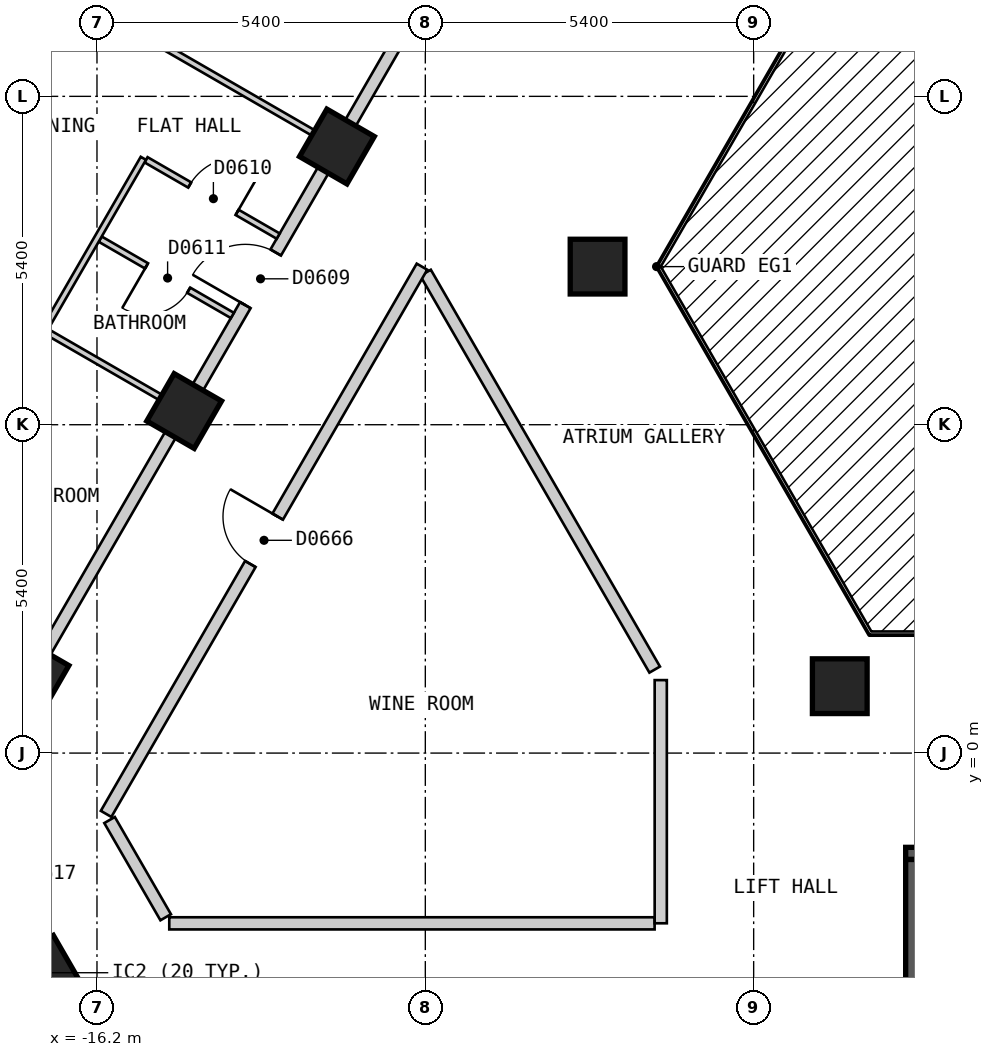
"""IFC4 building model, lengths in metres.
Left out: names, types, materials, properties, quantities, classifications, styles, units other than length and angle.
Written with IfcOpenShell. Run it as: python <this file> out.ifc"""

import sys

from ifc_helpers import new_model, si_unit, direction, frame, frame_2d, origin, origin_2d, place, context, subcontext, project, spatial, polyline, rectangle, outline, extrude, element, fill, save


model = new_model("IFC4")
c1 = context("Model", 3, precision=1e-05, world=origin(), true_north=direction((0.0, 1.0)))
c2 = subcontext(c1, "Body", "Model", "MODEL_VIEW")
j1 = project(units=[si_unit("LENGTHUNIT", "METRE"), si_unit("PLANEANGLEUNIT", "RADIAN")], contexts=[c1])
p1 = place(None, origin())
s1 = spatial("IfcSite", under=j1, at=p1, CompositionType="ELEMENT")
p2 = place(p1, origin())
s2 = spatial("IfcBuilding", under=s1, at=p2, CompositionType="ELEMENT")
p3 = place(p2, frame((0.0, 0.0, 81.0)))
s3 = spatial("IfcBuildingStorey", under=s2, at=p3, CompositionType="ELEMENT", Elevation=81.0)
for number, where, z_axis, x_axis in (
    (1, (-17.083, -3.612, 0.0), (0.0, 0.0, 1.0), (0.5, -0.866, 0.0)),
    (2, (-7.967, 8.0, 0.0), (0.0, 0.0, 1.0), (1.0, 0.0, 0.0)),
    (3, (-12.254, 9.975, 0.0), (0.0, 0.0, 1.0), (-0.5, -0.866, 0.0)),
    (4, (-14.766, 5.625, 0.0), (0.0, 0.0, 1.0), (-0.5, -0.866, 0.0)),
    (5, (-3.984, 1.1, 0.0), (0.0, 0.0, 1.0), (1.0, 0.0, 0.0)),
    (6, (-17.277, 1.275, 0.0), (0.0, 0.0, 1.0), (-0.5, -0.866, 0.0)),
):
    element("IfcColumn", number, at=place(p3, frame(where, z_axis=z_axis, x_axis=x_axis)), inside=s3, PredefinedType="COLUMN", context=c2, shape_type="SweptSolid", body=[
        extrude(rectangle(XDim=0.9, YDim=0.9, at=origin_2d()), origin(), (0.0, 0.0, 1.0), 3.0),
    ])
p4 = place(p3, frame((-15.747, 24.425, 0.0), z_axis=(0.0, 0.0, 1.0), x_axis=(-0.500027479704, -0.866009537788, 0.0)))
e7 = element("IfcWall", 7, at=p4, inside=s3, PredefinedType="SOLIDWALL", context=c2, shape_type="SweptSolid", body=[
    extrude(outline(polyline([(0.0, -0.15), (26.559, -0.15), (26.478, 0.15), (0.08, 0.15), (0.0, -0.15)])), origin(), (0.0, 0.0, 1.0), 2.7),
])
p5 = place(p4, frame((1.227, 0.0, 0.15)))
e8 = element("IfcOpeningElement", 8, at=p5, cuts=e7, PredefinedType="OPENING", context=c2, shape_type="SweptSolid", body=[
    extrude(rectangle(XDim=1.5, YDim=2.1, at=frame_2d((0.75, 1.05))), frame((0.0, 0.16, 0.0), z_axis=(0.0, -1.0, 0.0), x_axis=(1.0, 0.0, 0.0)), (0.0, 0.0, 1.0), 0.32),
])
p6 = place(p4, frame((3.739, 0.0, 0.15)))
e9 = element("IfcOpeningElement", 9, at=p6, cuts=e7, PredefinedType="OPENING", context=c2, shape_type="SweptSolid", body=[
    extrude(rectangle(XDim=1.5, YDim=2.1, at=frame_2d((0.75, 1.05))), frame((0.0, 0.16, 0.0), z_axis=(0.0, -1.0, 0.0), x_axis=(1.0, 0.0, 0.0)), (0.0, 0.0, 1.0), 0.32),
])
p7 = place(p4, frame((6.25, 0.0, 0.15)))
e10 = element("IfcOpeningElement", 10, at=p7, cuts=e7, PredefinedType="OPENING", context=c2, shape_type="SweptSolid", body=[
    extrude(rectangle(XDim=1.5, YDim=2.1, at=frame_2d((0.75, 1.05))), frame((0.0, 0.16, 0.0), z_axis=(0.0, -1.0, 0.0), x_axis=(1.0, 0.0, 0.0)), (0.0, 0.0, 1.0), 0.32),
])
p8 = place(p4, frame((8.761, 0.0, 0.15)))
e11 = element("IfcOpeningElement", 11, at=p8, cuts=e7, PredefinedType="OPENING", context=c2, shape_type="SweptSolid", body=[
    extrude(rectangle(XDim=1.5, YDim=2.1, at=frame_2d((0.75, 1.05))), frame((0.0, 0.16, 0.0), z_axis=(0.0, -1.0, 0.0), x_axis=(1.0, 0.0, 0.0)), (0.0, 0.0, 1.0), 0.32),
])
p9 = place(p4, frame((11.273, 0.0, 0.15)))
e12 = element("IfcOpeningElement", 12, at=p9, cuts=e7, PredefinedType="OPENING", context=c2, shape_type="SweptSolid", body=[
    extrude(rectangle(XDim=1.5, YDim=2.1, at=frame_2d((0.75, 1.05))), frame((0.0, 0.16, 0.0), z_axis=(0.0, -1.0, 0.0), x_axis=(1.0, 0.0, 0.0)), (0.0, 0.0, 1.0), 0.32),
])
p10 = place(p4, frame((13.785, 0.0, 0.15)))
e13 = element("IfcOpeningElement", 13, at=p10, cuts=e7, PredefinedType="OPENING", context=c2, shape_type="SweptSolid", body=[
    extrude(rectangle(XDim=1.5, YDim=2.1, at=frame_2d((0.75, 1.05))), frame((0.0, 0.16, 0.0), z_axis=(0.0, -1.0, 0.0), x_axis=(1.0, 0.0, 0.0)), (0.0, 0.0, 1.0), 0.32),
])
p11 = place(p4, frame((16.296, 0.0, 0.15)))
e14 = element("IfcOpeningElement", 14, at=p11, cuts=e7, PredefinedType="OPENING", context=c2, shape_type="SweptSolid", body=[
    extrude(rectangle(XDim=1.5, YDim=2.1, at=frame_2d((0.75, 1.05))), frame((0.0, 0.16, 0.0), z_axis=(0.0, -1.0, 0.0), x_axis=(1.0, 0.0, 0.0)), (0.0, 0.0, 1.0), 0.32),
])
p12 = place(p4, frame((18.807, 0.0, 0.15)))
e15 = element("IfcOpeningElement", 15, at=p12, cuts=e7, PredefinedType="OPENING", context=c2, shape_type="SweptSolid", body=[
    extrude(rectangle(XDim=1.5, YDim=2.1, at=frame_2d((0.75, 1.05))), frame((0.0, 0.16, 0.0), z_axis=(0.0, -1.0, 0.0), x_axis=(1.0, 0.0, 0.0)), (0.0, 0.0, 1.0), 0.32),
])
p13 = place(p4, frame((21.319, 0.0, 0.15)))
e16 = element("IfcOpeningElement", 16, at=p13, cuts=e7, PredefinedType="OPENING", context=c2, shape_type="SweptSolid", body=[
    extrude(rectangle(XDim=1.5, YDim=2.1, at=frame_2d((0.75, 1.05))), frame((0.0, 0.16, 0.0), z_axis=(0.0, -1.0, 0.0), x_axis=(1.0, 0.0, 0.0)), (0.0, 0.0, 1.0), 0.32),
])
p14 = place(p4, frame((23.831, 0.0, 0.15)))
e17 = element("IfcOpeningElement", 17, at=p14, cuts=e7, PredefinedType="OPENING", context=c2, shape_type="SweptSolid", body=[
    extrude(rectangle(XDim=1.5, YDim=2.1, at=frame_2d((0.75, 1.05))), frame((0.0, 0.16, 0.0), z_axis=(0.0, -1.0, 0.0), x_axis=(1.0, 0.0, 0.0)), (0.0, 0.0, 1.0), 0.32),
])
p15 = place(p3, frame((-2.9, -1.65, 0.0), z_axis=(0.0, 0.0, 1.0), x_axis=(1.0, 0.0, 0.0)))
e18 = element("IfcWall", 18, at=p15, inside=s3, PredefinedType="SOLIDWALL", context=c2, shape_type="SweptSolid", body=[
    extrude(rectangle(XDim=5.8, YDim=0.2, at=frame_2d((2.9, 0.0))), origin(), (0.0, 0.0, 1.0), 2.7),
])
p16 = place(p15, frame((0.3, 0.0, 0.0)))
e19 = element("IfcOpeningElement", 19, at=p16, cuts=e18, PredefinedType="OPENING", context=c2, shape_type="SweptSolid", body=[
    extrude(rectangle(XDim=1.2, YDim=2.1, at=frame_2d((0.6, 1.05))), frame((0.0, 0.11, 0.0), z_axis=(0.0, -1.0, 0.0), x_axis=(1.0, 0.0, 0.0)), (0.0, 0.0, 1.0), 0.22),
])
p17 = place(p3, frame((-2.8, -4.5, 0.0), z_axis=(0.0, 0.0, 1.0), x_axis=(0.0, 1.0, 0.0)))
e20 = element("IfcWall", 20, at=p17, inside=s3, PredefinedType="SOLIDWALL", context=c2, shape_type="SweptSolid", body=[
    extrude(rectangle(XDim=2.75, YDim=0.2, at=frame_2d((1.375, 0.0))), origin(), (0.0, 0.0, 1.0), 2.7),
])
p18 = place(p3, frame((-10.796, 7.899, 0.0), z_axis=(0.0, 0.0, 1.0), x_axis=(0.500010383074, -0.866019409031, 0.0)))
e21 = element("IfcWall", 21, at=p18, inside=s3, PredefinedType="PARTITIONING", context=c2, shape_type="SweptSolid", body=[
    extrude(rectangle(XDim=7.535, YDim=0.2, at=frame_2d((3.768, 0.0))), origin(), (0.0, 0.0, 1.0), 2.7),
])
p19 = place(p3, frame((-15.993, -1.101, 0.0), z_axis=(0.0, 0.0, 1.0), x_axis=(0.499894174133, -0.866086493757, 0.0)))
e22 = element("IfcWall", 22, at=p19, inside=s3, PredefinedType="PARTITIONING", context=c2, shape_type="SweptSolid", body=[
    extrude(rectangle(XDim=1.846, YDim=0.2, at=frame_2d((0.923, 0.0))), origin(), (0.0, 0.0, 1.0), 2.7),
])
p20 = place(p3, frame((-18.533, -1.101, 0.0), z_axis=(0.0, 0.0, 1.0), x_axis=(0.500022085096, -0.866012652573, 0.0)))
e23 = element("IfcWall", 23, at=p20, inside=s3, PredefinedType="PARTITIONING", context=c2, shape_type="SweptSolid", body=[
    extrude(rectangle(XDim=6.066, YDim=0.2, at=frame_2d((3.033, 0.0))), origin(), (0.0, 0.0, 1.0), 2.7),
])
p21 = place(p20, frame((0.532, 0.0, 0.0)))
e24 = element("IfcOpeningElement", 24, at=p21, cuts=e23, PredefinedType="OPENING", context=c2, shape_type="SweptSolid", body=[
    extrude(rectangle(XDim=1.0, YDim=2.1, at=frame_2d((0.5, 1.05))), frame((0.0, 0.11, 0.0), z_axis=(0.0, -1.0, 0.0), x_axis=(1.0, 0.0, 0.0)), (0.0, 0.0, 1.0), 0.22),
])
p22 = place(p3, frame((-15.011, -2.8, 0.0), z_axis=(0.0, 0.0, 1.0), x_axis=(1.0, 0.0, 0.0)))
e25 = element("IfcWall", 25, at=p22, inside=s3, PredefinedType="PARTITIONING", context=c2, shape_type="SweptSolid", body=[
    extrude(rectangle(XDim=7.982, YDim=0.2, at=frame_2d((3.991, 0.0))), origin(), (0.0, 0.0, 1.0), 2.7),
])
p23 = place(p3, frame((-16.05, -1.0, 0.0), z_axis=(0.0, 0.0, 1.0), x_axis=(0.499962449088, 0.866047082728, 0.0)))
e26 = element("IfcWall", 26, at=p23, inside=s3, PredefinedType="PARTITIONING", context=c2, shape_type="SweptSolid", body=[
    extrude(rectangle(XDim=10.391, YDim=0.2, at=frame_2d((5.195, 0.0))), origin(), (0.0, 0.0, 1.0), 2.7),
])
p24 = place(p23, frame((4.745, 0.0, 0.0)))
e27 = element("IfcOpeningElement", 27, at=p24, cuts=e26, PredefinedType="OPENING", context=c2, shape_type="SweptSolid", body=[
    extrude(rectangle(XDim=0.9, YDim=2.1, at=frame_2d((0.45, 1.05))), frame((0.0, 0.11, 0.0), z_axis=(0.0, -1.0, 0.0), x_axis=(1.0, 0.0, 0.0)), (0.0, 0.0, 1.0), 0.22),
])
p25 = place(p3, frame((-18.562, -0.951, 0.0), z_axis=(0.0, 0.0, 1.0), x_axis=(0.499992962407, 0.866029466902, 0.0)))
e28 = element("IfcWall", 28, at=p25, inside=s3, PredefinedType="PARTITIONING", context=c2, shape_type="SweptSolid", body=[
    extrude(rectangle(XDim=20.208, YDim=0.2, at=frame_2d((10.104, 0.0))), origin(), (0.0, 0.0, 1.0), 2.7),
])
p26 = place(p25, frame((9.604, 0.0, 0.0)))
e29 = element("IfcOpeningElement", 29, at=p26, cuts=e28, PredefinedType="OPENING", context=c2, shape_type="SweptSolid", body=[
    extrude(rectangle(XDim=1.0, YDim=2.1, at=frame_2d((0.5, 1.05))), frame((0.0, 0.11, 0.0), z_axis=(0.0, -1.0, 0.0), x_axis=(1.0, 0.0, 0.0)), (0.0, 0.0, 1.0), 0.22),
])
p27 = place(p3, frame((-6.928, -2.799, 0.0), z_axis=(0.0, 0.0, 1.0), x_axis=(0.0, 1.0, 0.0)))
e30 = element("IfcWall", 30, at=p27, inside=s3, PredefinedType="PARTITIONING", context=c2, shape_type="SweptSolid", body=[
    extrude(rectangle(XDim=3.999, YDim=0.2, at=frame_2d((2.0, 0.0))), origin(), (0.0, 0.0, 1.0), 2.7),
])
p28 = place(p3, frame((-16.147, 8.452, 0.0), z_axis=(0.0, 0.0, 1.0), x_axis=(0.866080321209, -0.499904868165, 0.0)))
e31 = element("IfcWall", 31, at=p28, inside=s3, PredefinedType="PARTITIONING", context=c2, shape_type="SweptSolid", body=[
    extrude(rectangle(XDim=2.51, YDim=0.1, at=frame_2d((1.255, 0.0))), origin(), (0.0, 0.0, 1.0), 2.7),
])
p29 = place(p28, frame((0.88, 0.0, 0.0)))
e32 = element("IfcOpeningElement", 32, at=p29, cuts=e31, PredefinedType="OPENING", context=c2, shape_type="SweptSolid", body=[
    extrude(rectangle(XDim=0.8, YDim=2.1, at=frame_2d((0.4, 1.05))), frame((0.0, 0.06, 0.0), z_axis=(0.0, -1.0, 0.0), x_axis=(1.0, 0.0, 0.0)), (0.0, 0.0, 1.0), 0.12),
])
p30 = place(p3, frame((-23.513, 10.675, 0.0), z_axis=(0.0, 0.0, 1.0), x_axis=(0.866041268327, -0.499972520799, 0.0)))
e33 = element("IfcWall", 33, at=p30, inside=s3, PredefinedType="PARTITIONING", context=c2, shape_type="SweptSolid", body=[
    extrude(rectangle(XDim=10.0, YDim=0.1, at=frame_2d((5.0, 0.0))), origin(), (0.0, 0.0, 1.0), 2.7),
])
p31 = place(p30, frame((4.325, 0.0, 0.0)))
e34 = element("IfcOpeningElement", 34, at=p31, cuts=e33, PredefinedType="OPENING", context=c2, shape_type="SweptSolid", body=[
    extrude(rectangle(XDim=0.9, YDim=2.1, at=frame_2d((0.45, 1.05))), frame((0.0, 0.06, 0.0), z_axis=(0.0, -1.0, 0.0), x_axis=(1.0, 0.0, 0.0)), (0.0, 0.0, 1.0), 0.12),
])
p32 = place(p3, frame((-15.393, 9.757, 0.0), z_axis=(0.0, 0.0, 1.0), x_axis=(0.865940918122, -0.500146304917, 0.0)))
e35 = element("IfcWall", 35, at=p32, inside=s3, PredefinedType="PARTITIONING", context=c2, shape_type="SweptSolid", body=[
    extrude(rectangle(XDim=2.51, YDim=0.1, at=frame_2d((1.255, 0.0))), origin(), (0.0, 0.0, 1.0), 2.7),
])
p33 = place(p32, frame((0.829, 0.0, 0.0)))
e36 = element("IfcOpeningElement", 36, at=p33, cuts=e35, PredefinedType="OPENING", context=c2, shape_type="SweptSolid", body=[
    extrude(rectangle(XDim=0.9, YDim=2.1, at=frame_2d((0.45, 1.05))), frame((0.0, 0.06, 0.0), z_axis=(0.0, -1.0, 0.0), x_axis=(1.0, 0.0, 0.0)), (0.0, 0.0, 1.0), 0.12),
])
p34 = place(p3, frame((-21.001, 15.025, 0.0), z_axis=(0.0, 0.0, 1.0), x_axis=(0.866016855193, -0.500014806302, 0.0)))
e37 = element("IfcWall", 37, at=p34, inside=s3, PredefinedType="PARTITIONING", context=c2, shape_type="SweptSolid", body=[
    extrude(rectangle(XDim=10.0, YDim=0.1, at=frame_2d((5.0, 0.0))), origin(), (0.0, 0.0, 1.0), 2.7),
])
p35 = place(p34, frame((4.305, 0.0, 0.0)))
e38 = element("IfcOpeningElement", 38, at=p35, cuts=e37, PredefinedType="OPENING", context=c2, shape_type="SweptSolid", body=[
    extrude(rectangle(XDim=0.9, YDim=2.1, at=frame_2d((0.45, 1.05))), frame((0.0, 0.06, 0.0), z_axis=(0.0, -1.0, 0.0), x_axis=(1.0, 0.0, 0.0)), (0.0, 0.0, 1.0), 0.12),
])
p36 = place(p3, frame((-17.044, 6.999, 0.0), z_axis=(0.0, 0.0, 1.0), x_axis=(0.500176309913, 0.865923587277, 0.0)))
e39 = element("IfcWall", 39, at=p36, inside=s3, PredefinedType="PARTITIONING", context=c2, shape_type="SweptSolid", body=[
    extrude(rectangle(XDim=3.213, YDim=0.1, at=frame_2d((1.606, 0.0))), origin(), (0.0, 0.0, 1.0), 2.7),
])
p37 = place(p26, origin())
e40 = element("IfcDoor", 40, at=p37, inside=s3, OperationType="SINGLE_SWING_LEFT", PredefinedType="DOOR", context=c2, shape_type="SweptSolid", body=[
    extrude(rectangle(XDim=1.0, YDim=2.1, at=frame_2d((0.5, 1.05))), frame((0.0, 0.025, 0.0), z_axis=(0.0, -1.0, 0.0), x_axis=(1.0, 0.0, 0.0)), (0.0, 0.0, 1.0), 0.05),
])
fill(e29, e40)
p38 = place(p33, origin())
e41 = element("IfcDoor", 41, at=p38, inside=s3, OperationType="SINGLE_SWING_RIGHT", PredefinedType="DOOR", context=c2, shape_type="SweptSolid", body=[
    extrude(rectangle(XDim=0.9, YDim=2.1, at=frame_2d((0.45, 1.05))), frame((0.0, 0.025, 0.0), z_axis=(0.0, -1.0, 0.0), x_axis=(1.0, 0.0, 0.0)), (0.0, 0.0, 1.0), 0.05),
])
fill(e36, e41)
p39 = place(p29, origin())
e42 = element("IfcDoor", 42, at=p39, inside=s3, OperationType="SINGLE_SWING_LEFT", PredefinedType="DOOR", context=c2, shape_type="SweptSolid", body=[
    extrude(rectangle(XDim=0.8, YDim=2.1, at=frame_2d((0.4, 1.05))), frame((0.0, 0.025, 0.0), z_axis=(0.0, -1.0, 0.0), x_axis=(1.0, 0.0, 0.0)), (0.0, 0.0, 1.0), 0.05),
])
fill(e32, e42)
p40 = place(p24, origin())
e43 = element("IfcDoor", 43, at=p40, inside=s3, OperationType="SINGLE_SWING_RIGHT", PredefinedType="DOOR", context=c2, shape_type="SweptSolid", body=[
    extrude(rectangle(XDim=0.9, YDim=2.1, at=frame_2d((0.45, 1.05))), frame((0.0, 0.025, 0.0), z_axis=(0.0, -1.0, 0.0), x_axis=(1.0, 0.0, 0.0)), (0.0, 0.0, 1.0), 0.05),
])
fill(e27, e43)
save(model, sys.argv[1])
